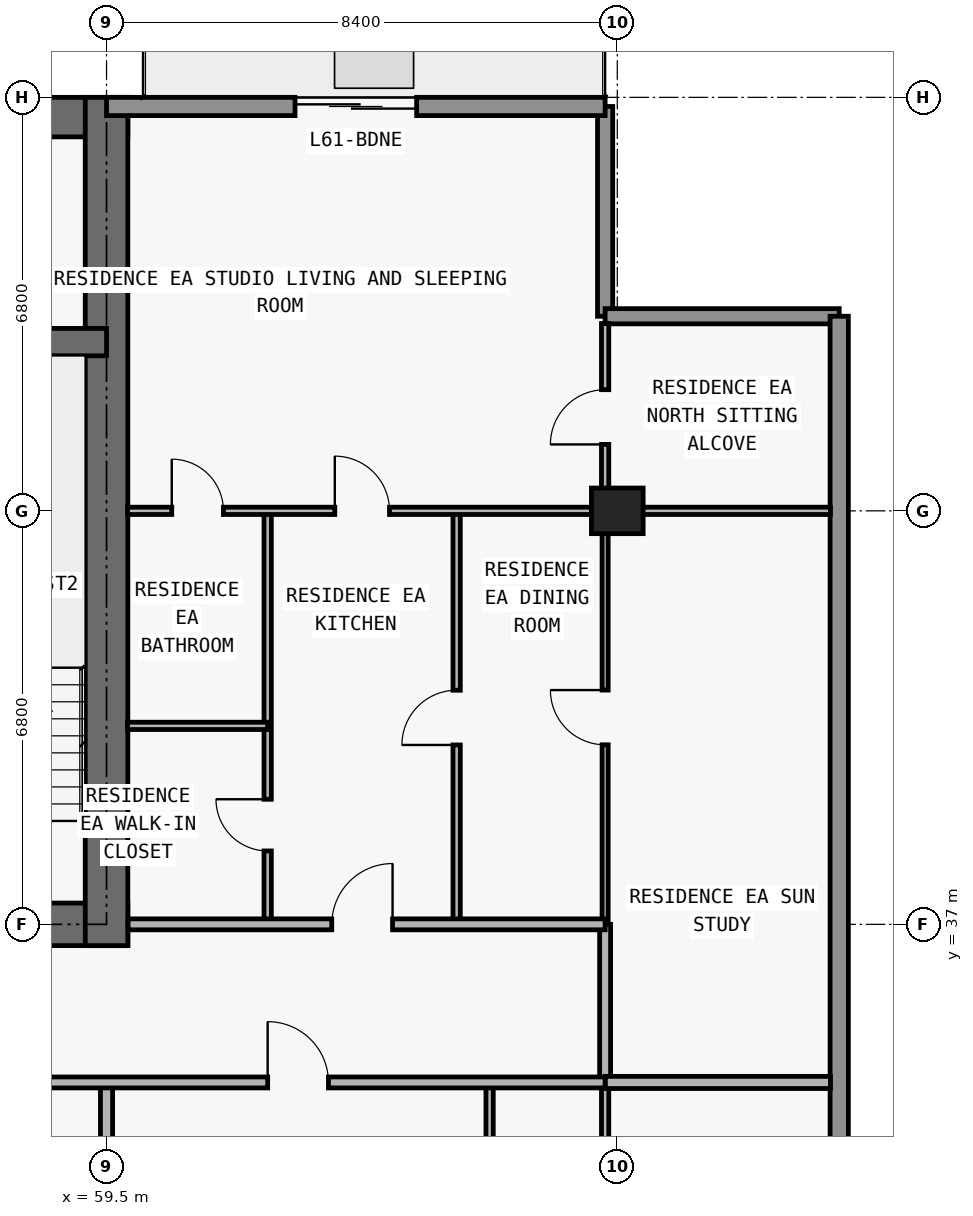
"""IFC4 building model, lengths in metres.
Left out: names, types, materials, properties, quantities, classifications, styles, units other than length and angle.
Written with IfcOpenShell. Run it as: python <this file> out.ifc"""

import sys

from ifc_helpers import new_model, si_unit, direction, frame, frame_2d, origin, origin_2d, place, context, subcontext, project, spatial, rectangle, extrude, element, fill, save


model = new_model("IFC4")
c1 = context("Model", 3, precision=1e-05, world=origin(), true_north=direction((0.0, 1.0)))
c2 = subcontext(c1, "Body", "Model", "MODEL_VIEW")
j1 = project(units=[si_unit("LENGTHUNIT", "METRE"), si_unit("PLANEANGLEUNIT", "RADIAN")], contexts=[c1])
p1 = place(None, origin())
s1 = spatial("IfcSite", under=j1, at=p1, CompositionType="ELEMENT")
p2 = place(p1, origin())
s2 = spatial("IfcBuilding", under=s1, at=p2, CompositionType="ELEMENT")
p3 = place(p2, frame((0.0, 0.0, 218.1)))
s3 = spatial("IfcBuildingStorey", under=s2, at=p3, CompositionType="ELEMENT", Elevation=218.1)
p4 = place(p3, frame((67.9, 43.8, 0.0), z_axis=(0.0, 0.0, 1.0), x_axis=(1.0, 0.0, 0.0)))
e1 = element("IfcColumn", 1, at=p4, inside=s3, PredefinedType="COLUMN", context=c2, shape_type="SweptSolid", body=[
    extrude(rectangle(XDim=0.85, YDim=0.75, at=origin_2d()), origin(), (0.0, 0.0, 1.0), 3.0),
])
p5 = place(p3, frame((17.95, 37.0, 0.0), z_axis=(0.0, 0.0, 1.0), x_axis=(1.0, 0.0, 0.0)))
e2 = element("IfcWall", 2, at=p5, inside=s3, PredefinedType="SHEAR", context=c2, shape_type="SweptSolid", body=[
    extrude(rectangle(XDim=41.9, YDim=0.7, at=frame_2d((20.95, 0.0))), origin(), (0.0, 0.0, 1.0), 3.0),
])
p6 = place(p5, frame((14.35, 0.0, 0.0)))
e3 = element("IfcOpeningElement", 3, at=p6, cuts=e2, PredefinedType="OPENING", context=c2, shape_type="SweptSolid", body=[
    extrude(rectangle(XDim=1.1, YDim=2.15, at=frame_2d((0.55, 1.075))), frame((0.0, 0.36, 0.0), z_axis=(0.0, -1.0, 0.0), x_axis=(1.0, 0.0, 0.0)), (0.0, 0.0, 1.0), 0.72),
])
p7 = place(p5, frame((6.2, 0.0, 0.0)))
e4 = element("IfcOpeningElement", 4, at=p7, cuts=e2, PredefinedType="OPENING", context=c2, shape_type="SweptSolid", body=[
    extrude(rectangle(XDim=1.05, YDim=2.15, at=frame_2d((0.525, 1.075))), frame((0.0, 0.36, 0.0), z_axis=(0.0, -1.0, 0.0), x_axis=(1.0, 0.0, 0.0)), (0.0, 0.0, 1.0), 0.72),
])
p8 = place(p5, frame((34.7, 0.0, 0.0)))
e5 = element("IfcOpeningElement", 5, at=p8, cuts=e2, PredefinedType="OPENING", context=c2, shape_type="SweptSolid", body=[
    extrude(rectangle(XDim=1.05, YDim=2.15, at=frame_2d((0.525, 1.075))), frame((0.0, 0.36, 0.0), z_axis=(0.0, -1.0, 0.0), x_axis=(1.0, 0.0, 0.0)), (0.0, 0.0, 1.0), 0.72),
])
p9 = place(p5, frame((10.812, 0.0, 0.0)))
e6 = element("IfcOpeningElement", 6, at=p9, cuts=e2, PredefinedType="OPENING", context=c2, shape_type="SweptSolid", body=[
    extrude(rectangle(XDim=1.05, YDim=2.15, at=frame_2d((0.525, 1.075))), frame((0.0, 0.36, 0.0), z_axis=(0.0, -1.0, 0.0), x_axis=(1.0, 0.0, 0.0)), (0.0, 0.0, 1.0), 0.72),
])
p10 = place(p5, frame((24.05, 0.0, 0.0)))
e7 = element("IfcOpeningElement", 7, at=p10, cuts=e2, PredefinedType="OPENING", context=c2, shape_type="SweptSolid", body=[
    extrude(rectangle(XDim=1.05, YDim=2.15, at=frame_2d((0.525, 1.075))), frame((0.0, 0.36, 0.0), z_axis=(0.0, -1.0, 0.0), x_axis=(1.0, 0.0, 0.0)), (0.0, 0.0, 1.0), 0.72),
])
p11 = place(p3, frame((17.95, 50.275, 0.0), z_axis=(0.0, 0.0, 1.0), x_axis=(1.0, 0.0, 0.0)))
e8 = element("IfcWall", 8, at=p11, inside=s3, PredefinedType="SHEAR", context=c2, shape_type="SweptSolid", body=[
    extrude(rectangle(XDim=41.9, YDim=0.65, at=frame_2d((20.95, 0.0))), origin(), (0.0, 0.0, 1.0), 3.0),
])
p12 = place(p3, frame((59.5, 36.65, 0.0), z_axis=(0.0, 0.0, 1.0), x_axis=(0.0, 1.0, 0.0)))
e9 = element("IfcWall", 9, at=p12, inside=s3, PredefinedType="SHEAR", context=c2, shape_type="SweptSolid", body=[
    extrude(rectangle(XDim=13.95, YDim=0.7, at=frame_2d((6.975, 0.0))), origin(), (0.0, 0.0, 1.0), 3.0),
])
p13 = place(p3, frame((18.3, 46.575, 0.0), z_axis=(0.0, 0.0, 1.0), x_axis=(1.0, 0.0, 0.0)))
e10 = element("IfcWall", 10, at=p13, inside=s3, PredefinedType="SHEAR", context=c2, shape_type="SweptSolid", body=[
    extrude(rectangle(XDim=41.2, YDim=0.45, at=frame_2d((20.6, 0.0))), origin(), (0.0, 0.0, 1.0), 3.0),
])
p14 = place(p13, frame((7.575, 0.0, 0.0)))
e11 = element("IfcOpeningElement", 11, at=p14, cuts=e10, PredefinedType="OPENING", context=c2, shape_type="SweptSolid", body=[
    extrude(rectangle(XDim=1.05, YDim=2.15, at=frame_2d((0.525, 1.075))), frame((0.0, 0.235, 0.0), z_axis=(0.0, -1.0, 0.0), x_axis=(1.0, 0.0, 0.0)), (0.0, 0.0, 1.0), 0.47),
])
p15 = place(p13, frame((32.625, 0.0, 0.0)))
e12 = element("IfcOpeningElement", 12, at=p15, cuts=e10, PredefinedType="OPENING", context=c2, shape_type="SweptSolid", body=[
    extrude(rectangle(XDim=1.05, YDim=2.15, at=frame_2d((0.525, 1.075))), frame((0.0, 0.235, 0.0), z_axis=(0.0, -1.0, 0.0), x_axis=(1.0, 0.0, 0.0)), (0.0, 0.0, 1.0), 0.47),
])
p16 = place(p3, frame((67.7, 50.45, 0.0), z_axis=(0.0, 0.0, 1.0), x_axis=(0.0, -1.0, 0.0)))
e13 = element("IfcWall", 13, at=p16, inside=s3, PredefinedType="ELEMENTEDWALL", context=c2, shape_type="SweptSolid", body=[
    extrude(rectangle(XDim=3.45, YDim=0.25, at=frame_2d((1.725, 0.0))), origin(), (0.0, 0.0, 1.0), 3.0),
])
p17 = place(p3, frame((67.7, 47.0, 0.0), z_axis=(0.0, 0.0, 1.0), x_axis=(1.0, 0.0, 0.0)))
e14 = element("IfcWall", 14, at=p17, inside=s3, PredefinedType="ELEMENTEDWALL", context=c2, shape_type="SweptSolid", body=[
    extrude(rectangle(XDim=3.85, YDim=0.25, at=frame_2d((1.925, 0.0))), origin(), (0.0, 0.0, 1.0), 3.0),
])
p18 = place(p3, frame((71.55, 47.0, 0.0), z_axis=(0.0, 0.0, 1.0), x_axis=(0.0, -1.0, 0.0)))
e15 = element("IfcWall", 15, at=p18, inside=s3, PredefinedType="STANDARD", context=c2, shape_type="SweptSolid", body=[
    extrude(rectangle(XDim=17.9, YDim=0.3, at=frame_2d((8.95, 0.0))), origin(), (0.0, 0.0, 1.0), 3.0),
])
p19 = place(p3, frame((59.5, 50.45, 0.0), z_axis=(0.0, 0.0, 1.0), x_axis=(1.0, 0.0, 0.0)))
e16 = element("IfcWall", 16, at=p19, inside=s3, PredefinedType="STANDARD", context=c2, shape_type="SweptSolid", body=[
    extrude(rectangle(XDim=8.2, YDim=0.3, at=frame_2d((4.1, 0.0))), origin(), (0.0, 0.0, 1.0), 3.0),
])
p20 = place(p19, frame((3.1, 0.0, 0.0)))
e17 = element("IfcOpeningElement", 17, at=p20, cuts=e16, PredefinedType="OPENING", context=c2, shape_type="SweptSolid", body=[
    extrude(rectangle(XDim=2.0, YDim=2.3, at=frame_2d((1.0, 1.15))), frame((0.0, 0.16, 0.0), z_axis=(0.0, -1.0, 0.0), x_axis=(1.0, 0.0, 0.0)), (0.0, 0.0, 1.0), 0.32),
])
p21 = place(p3, frame((59.5, 29.1, 0.0), z_axis=(0.0, 0.0, 1.0), x_axis=(0.0, 1.0, 0.0)))
e18 = element("IfcWall", 18, at=p21, inside=s3, PredefinedType="PARTITIONING", context=c2, shape_type="SweptSolid", body=[
    extrude(rectangle(XDim=5.3, YDim=0.2, at=frame_2d((2.65, 0.0))), origin(), (0.0, 0.0, 1.0), 2.213),
])
p22 = place(p3, frame((62.15, 37.0, 0.0), z_axis=(0.0, 0.0, 1.0), x_axis=(0.0, 1.0, 0.0)))
e19 = element("IfcWall", 19, at=p22, inside=s3, PredefinedType="PARTITIONING", context=c2, shape_type="SweptSolid", body=[
    extrude(rectangle(XDim=6.8, YDim=0.12, at=frame_2d((3.4, 0.0))), origin(), (0.0, 0.0, 1.0), 3.0),
])
p23 = place(p22, frame((1.207, 0.0, 0.0)))
e20 = element("IfcOpeningElement", 20, at=p23, cuts=e19, PredefinedType="OPENING", context=c2, shape_type="SweptSolid", body=[
    extrude(rectangle(XDim=0.85, YDim=2.1, at=frame_2d((0.425, 1.05))), frame((0.0, 0.07, 0.0), z_axis=(0.0, -1.0, 0.0), x_axis=(1.0, 0.0, 0.0)), (0.0, 0.0, 1.0), 0.14),
])
p24 = place(p3, frame((65.258, 37.0, 0.0), z_axis=(0.0, 0.0, 1.0), x_axis=(0.0, 1.0, 0.0)))
e21 = element("IfcWall", 21, at=p24, inside=s3, PredefinedType="PARTITIONING", context=c2, shape_type="SweptSolid", body=[
    extrude(rectangle(XDim=6.8, YDim=0.12, at=frame_2d((3.4, 0.0))), origin(), (0.0, 0.0, 1.0), 3.0),
])
p25 = place(p24, frame((2.95, 0.0, 0.0)))
e22 = element("IfcOpeningElement", 22, at=p25, cuts=e21, PredefinedType="OPENING", context=c2, shape_type="SweptSolid", body=[
    extrude(rectangle(XDim=0.9, YDim=2.15, at=frame_2d((0.45, 1.075))), frame((0.0, 0.07, 0.0), z_axis=(0.0, -1.0, 0.0), x_axis=(1.0, 0.0, 0.0)), (0.0, 0.0, 1.0), 0.14),
])
p26 = place(p3, frame((65.8, 29.1, 0.0), z_axis=(0.0, 0.0, 1.0), x_axis=(0.0, 1.0, 0.0)))
e23 = element("IfcWall", 23, at=p26, inside=s3, PredefinedType="PARTITIONING", context=c2, shape_type="SweptSolid", body=[
    extrude(rectangle(XDim=5.3, YDim=0.12, at=frame_2d((2.65, 0.0))), origin(), (0.0, 0.0, 1.0), 2.675),
])
p27 = place(p26, frame((2.225, 0.0, 0.0)))
e24 = element("IfcOpeningElement", 24, at=p27, cuts=e23, PredefinedType="OPENING", context=c2, shape_type="SweptSolid", body=[
    extrude(rectangle(XDim=0.85, YDim=2.1, at=frame_2d((0.425, 1.05))), frame((0.0, 0.07, 0.0), z_axis=(0.0, -1.0, 0.0), x_axis=(1.0, 0.0, 0.0)), (0.0, 0.0, 1.0), 0.14),
])
p28 = place(p3, frame((67.7, 29.1, 0.0), z_axis=(0.0, 0.0, 1.0), x_axis=(0.0, 1.0, 0.0)))
e25 = element("IfcWall", 25, at=p28, inside=s3, PredefinedType="PARTITIONING", context=c2, shape_type="SweptSolid", body=[
    extrude(rectangle(XDim=5.3, YDim=0.12, at=frame_2d((2.65, 0.0))), origin(), (0.0, 0.0, 1.0), 2.213),
])
p29 = place(p3, frame((67.7, 34.405, 0.0), z_axis=(0.0, 0.0, 1.0), x_axis=(0.0, 1.0, 0.0)))
e26 = element("IfcWall", 26, at=p29, inside=s3, PredefinedType="PARTITIONING", context=c2, shape_type="SweptSolid", body=[
    extrude(rectangle(XDim=2.595, YDim=0.18, at=frame_2d((1.297, 0.0))), origin(), (0.0, 0.0, 1.0), 2.213),
])
p30 = place(p3, frame((67.7, 37.005, 0.0), z_axis=(0.0, 0.0, 1.0), x_axis=(0.0, 1.0, 0.0)))
e27 = element("IfcWall", 27, at=p30, inside=s3, PredefinedType="MOVABLE", context=c2, shape_type="SweptSolid", body=[
    extrude(rectangle(XDim=6.795, YDim=0.1, at=frame_2d((3.397, 0.0))), origin(), (0.0, 0.0, 1.0), 2.213),
])
p31 = place(p30, frame((2.948, 0.0, 0.0)))
e28 = element("IfcOpeningElement", 28, at=p31, cuts=e27, PredefinedType="OPENING", context=c2, shape_type="SweptSolid", body=[
    extrude(rectangle(XDim=0.9, YDim=2.15, at=frame_2d((0.45, 1.075))), frame((0.0, 0.06, 0.0), z_axis=(0.0, -1.0, 0.0), x_axis=(1.0, 0.0, 0.0)), (0.0, 0.0, 1.0), 0.12),
])
p32 = place(p3, frame((67.7, 43.805, 0.0), z_axis=(0.0, 0.0, 1.0), x_axis=(0.0, 1.0, 0.0)))
e29 = element("IfcWall", 29, at=p32, inside=s3, PredefinedType="PARTITIONING", context=c2, shape_type="SweptSolid", body=[
    extrude(rectangle(XDim=3.075, YDim=0.12, at=frame_2d((1.538, 0.0))), origin(), (0.0, 0.0, 1.0), 3.0),
])
p33 = place(p32, frame((1.087, 0.0, 0.0)))
e30 = element("IfcOpeningElement", 30, at=p33, cuts=e29, PredefinedType="OPENING", context=c2, shape_type="SweptSolid", body=[
    extrude(rectangle(XDim=0.9, YDim=2.15, at=frame_2d((0.45, 1.075))), frame((0.0, 0.07, 0.0), z_axis=(0.0, -1.0, 0.0), x_axis=(1.0, 0.0, 0.0)), (0.0, 0.0, 1.0), 0.14),
])
p34 = place(p3, frame((39.28, 34.4, 0.0), z_axis=(0.0, 0.0, 1.0), x_axis=(1.0, 0.0, 0.0)))
e31 = element("IfcWall", 31, at=p34, inside=s3, PredefinedType="PARTITIONING", context=c2, shape_type="SweptSolid", body=[
    extrude(rectangle(XDim=28.42, YDim=0.18, at=frame_2d((14.21, 0.0))), origin(), (0.0, 0.0, 1.0), 3.0),
])
p35 = place(p34, frame((6.18, 0.0, 0.0)))
e32 = element("IfcOpeningElement", 32, at=p35, cuts=e31, PredefinedType="OPENING", context=c2, shape_type="SweptSolid", body=[
    extrude(rectangle(XDim=1.0, YDim=2.2, at=frame_2d((0.5, 1.1))), frame((0.0, 0.1, 0.0), z_axis=(0.0, -1.0, 0.0), x_axis=(1.0, 0.0, 0.0)), (0.0, 0.0, 1.0), 0.2),
])
p36 = place(p34, frame((14.695, 0.0, 0.0)))
e33 = element("IfcOpeningElement", 33, at=p36, cuts=e31, PredefinedType="OPENING", context=c2, shape_type="SweptSolid", body=[
    extrude(rectangle(XDim=1.0, YDim=2.2, at=frame_2d((0.5, 1.1))), frame((0.0, 0.1, 0.0), z_axis=(0.0, -1.0, 0.0), x_axis=(1.0, 0.0, 0.0)), (0.0, 0.0, 1.0), 0.2),
])
p37 = place(p34, frame((22.87, 0.0, 0.0)))
e34 = element("IfcOpeningElement", 34, at=p37, cuts=e31, PredefinedType="OPENING", context=c2, shape_type="SweptSolid", body=[
    extrude(rectangle(XDim=1.0, YDim=2.2, at=frame_2d((0.5, 1.1))), frame((0.0, 0.1, 0.0), z_axis=(0.0, -1.0, 0.0), x_axis=(1.0, 0.0, 0.0)), (0.0, 0.0, 1.0), 0.2),
])
p38 = place(p3, frame((67.705, 34.4, 0.0), z_axis=(0.0, 0.0, 1.0), x_axis=(1.0, 0.0, 0.0)))
e35 = element("IfcWall", 35, at=p38, inside=s3, PredefinedType="PARTITIONING", context=c2, shape_type="SweptSolid", body=[
    extrude(rectangle(XDim=3.7, YDim=0.2, at=frame_2d((1.85, 0.0))), origin(), (0.0, 0.0, 1.0), 3.0),
])
p39 = place(p3, frame((59.855, 37.0, 0.0), z_axis=(0.0, 0.0, 1.0), x_axis=(1.0, 0.0, 0.0)))
e36 = element("IfcWall", 36, at=p39, inside=s3, PredefinedType="PARTITIONING", context=c2, shape_type="SweptSolid", body=[
    extrude(rectangle(XDim=7.845, YDim=0.18, at=frame_2d((3.922, 0.0))), origin(), (0.0, 0.0, 1.0), 3.0),
])
p40 = place(p39, frame((3.349, 0.0, 0.0)))
e37 = element("IfcOpeningElement", 37, at=p40, cuts=e36, PredefinedType="OPENING", context=c2, shape_type="SweptSolid", body=[
    extrude(rectangle(XDim=1.0, YDim=2.2, at=frame_2d((0.5, 1.1))), frame((0.0, 0.1, 0.0), z_axis=(0.0, -1.0, 0.0), x_axis=(1.0, 0.0, 0.0)), (0.0, 0.0, 1.0), 0.2),
])
p41 = place(p3, frame((59.845, 40.264, 0.0), z_axis=(0.0, 0.0, 1.0), x_axis=(1.0, 0.0, 0.0)))
e38 = element("IfcWall", 38, at=p41, inside=s3, PredefinedType="PARTITIONING", context=c2, shape_type="SweptSolid", body=[
    extrude(rectangle(XDim=2.305, YDim=0.12, at=frame_2d((1.152, 0.0))), origin(), (0.0, 0.0, 1.0), 3.0),
])
p42 = place(p3, frame((59.845, 43.8, 0.0), z_axis=(0.0, 0.0, 1.0), x_axis=(1.0, 0.0, 0.0)))
e39 = element("IfcWall", 39, at=p42, inside=s3, PredefinedType="PARTITIONING", context=c2, shape_type="SweptSolid", body=[
    extrude(rectangle(XDim=11.56, YDim=0.12, at=frame_2d((5.78, 0.0))), origin(), (0.0, 0.0, 1.0), 2.368),
])
p43 = place(p42, frame((3.409, 0.0, 0.0)))
e40 = element("IfcOpeningElement", 40, at=p43, cuts=e39, PredefinedType="OPENING", context=c2, shape_type="SweptSolid", body=[
    extrude(rectangle(XDim=0.9, YDim=2.15, at=frame_2d((0.45, 1.075))), frame((0.0, 0.07, 0.0), z_axis=(0.0, -1.0, 0.0), x_axis=(1.0, 0.0, 0.0)), (0.0, 0.0, 1.0), 0.14),
])
p44 = place(p42, frame((0.728, 0.0, 0.0)))
e41 = element("IfcOpeningElement", 41, at=p44, cuts=e39, PredefinedType="OPENING", context=c2, shape_type="SweptSolid", body=[
    extrude(rectangle(XDim=0.85, YDim=2.1, at=frame_2d((0.425, 1.05))), frame((0.0, 0.07, 0.0), z_axis=(0.0, -1.0, 0.0), x_axis=(1.0, 0.0, 0.0)), (0.0, 0.0, 1.0), 0.14),
])
p45 = place(p20, origin())
e42 = element("IfcDoor", 42, at=p45, inside=s3, OperationType="DOUBLE_DOOR_SLIDING", PredefinedType="DOOR", context=c2, shape_type="SweptSolid", body=[
    extrude(rectangle(XDim=2.0, YDim=2.3, at=frame_2d((1.0, 1.15))), frame((0.0, 0.025, 0.0), z_axis=(0.0, -1.0, 0.0), x_axis=(1.0, 0.0, 0.0)), (0.0, 0.0, 1.0), 0.05),
])
fill(e17, e42)
p46 = place(p37, origin())
e43 = element("IfcDoor", 43, at=p46, inside=s3, OperationType="SINGLE_SWING_LEFT", PredefinedType="DOOR", context=c2, shape_type="SweptSolid", body=[
    extrude(rectangle(XDim=1.0, YDim=2.2, at=frame_2d((0.5, 1.1))), frame((0.0, 0.025, 0.0), z_axis=(0.0, -1.0, 0.0), x_axis=(1.0, 0.0, 0.0)), (0.0, 0.0, 1.0), 0.05),
])
fill(e34, e43)
p47 = place(p25, origin())
e44 = element("IfcDoor", 44, at=p47, inside=s3, OperationType="SINGLE_SWING_LEFT", PredefinedType="DOOR", context=c2, shape_type="SweptSolid", body=[
    extrude(rectangle(XDim=0.9, YDim=2.15, at=frame_2d((0.45, 1.075))), frame((0.0, 0.025, 0.0), z_axis=(0.0, -1.0, 0.0), x_axis=(1.0, 0.0, 0.0)), (0.0, 0.0, 1.0), 0.05),
])
fill(e22, e44)
p48 = place(p40, origin())
e45 = element("IfcDoor", 45, at=p48, inside=s3, OperationType="SINGLE_SWING_RIGHT", PredefinedType="DOOR", context=c2, shape_type="SweptSolid", body=[
    extrude(rectangle(XDim=1.0, YDim=2.2, at=frame_2d((0.5, 1.1))), frame((0.0, 0.025, 0.0), z_axis=(0.0, -1.0, 0.0), x_axis=(1.0, 0.0, 0.0)), (0.0, 0.0, 1.0), 0.05),
])
fill(e37, e45)
p49 = place(p43, origin())
e46 = element("IfcDoor", 46, at=p49, inside=s3, OperationType="SINGLE_SWING_LEFT", PredefinedType="DOOR", context=c2, shape_type="SweptSolid", body=[
    extrude(rectangle(XDim=0.9, YDim=2.15, at=frame_2d((0.45, 1.075))), frame((0.0, 0.025, 0.0), z_axis=(0.0, -1.0, 0.0), x_axis=(1.0, 0.0, 0.0)), (0.0, 0.0, 1.0), 0.05),
])
fill(e40, e46)
p50 = place(p23, origin())
e47 = element("IfcDoor", 47, at=p50, inside=s3, OperationType="SINGLE_SWING_RIGHT", PredefinedType="DOOR", context=c2, shape_type="SweptSolid", body=[
    extrude(rectangle(XDim=0.85, YDim=2.1, at=frame_2d((0.425, 1.05))), frame((0.0, 0.025, 0.0), z_axis=(0.0, -1.0, 0.0), x_axis=(1.0, 0.0, 0.0)), (0.0, 0.0, 1.0), 0.05),
])
fill(e20, e47)
p51 = place(p44, origin())
e48 = element("IfcDoor", 48, at=p51, inside=s3, OperationType="SINGLE_SWING_LEFT", PredefinedType="DOOR", context=c2, shape_type="SweptSolid", body=[
    extrude(rectangle(XDim=0.85, YDim=2.1, at=frame_2d((0.425, 1.05))), frame((0.0, 0.025, 0.0), z_axis=(0.0, -1.0, 0.0), x_axis=(1.0, 0.0, 0.0)), (0.0, 0.0, 1.0), 0.05),
])
fill(e41, e48)
p52 = place(p31, origin())
e49 = element("IfcDoor", 49, at=p52, inside=s3, OperationType="SINGLE_SWING_RIGHT", PredefinedType="DOOR", context=c2, shape_type="SweptSolid", body=[
    extrude(rectangle(XDim=0.9, YDim=2.15, at=frame_2d((0.45, 1.075))), frame((0.0, 0.025, 0.0), z_axis=(0.0, -1.0, 0.0), x_axis=(1.0, 0.0, 0.0)), (0.0, 0.0, 1.0), 0.05),
])
fill(e28, e49)
p53 = place(p33, origin())
e50 = element("IfcDoor", 50, at=p53, inside=s3, OperationType="SINGLE_SWING_LEFT", PredefinedType="DOOR", context=c2, shape_type="SweptSolid", body=[
    extrude(rectangle(XDim=0.9, YDim=2.15, at=frame_2d((0.45, 1.075))), frame((0.0, 0.025, 0.0), z_axis=(0.0, -1.0, 0.0), x_axis=(1.0, 0.0, 0.0)), (0.0, 0.0, 1.0), 0.05),
])
fill(e30, e50)
save(model, sys.argv[1])
